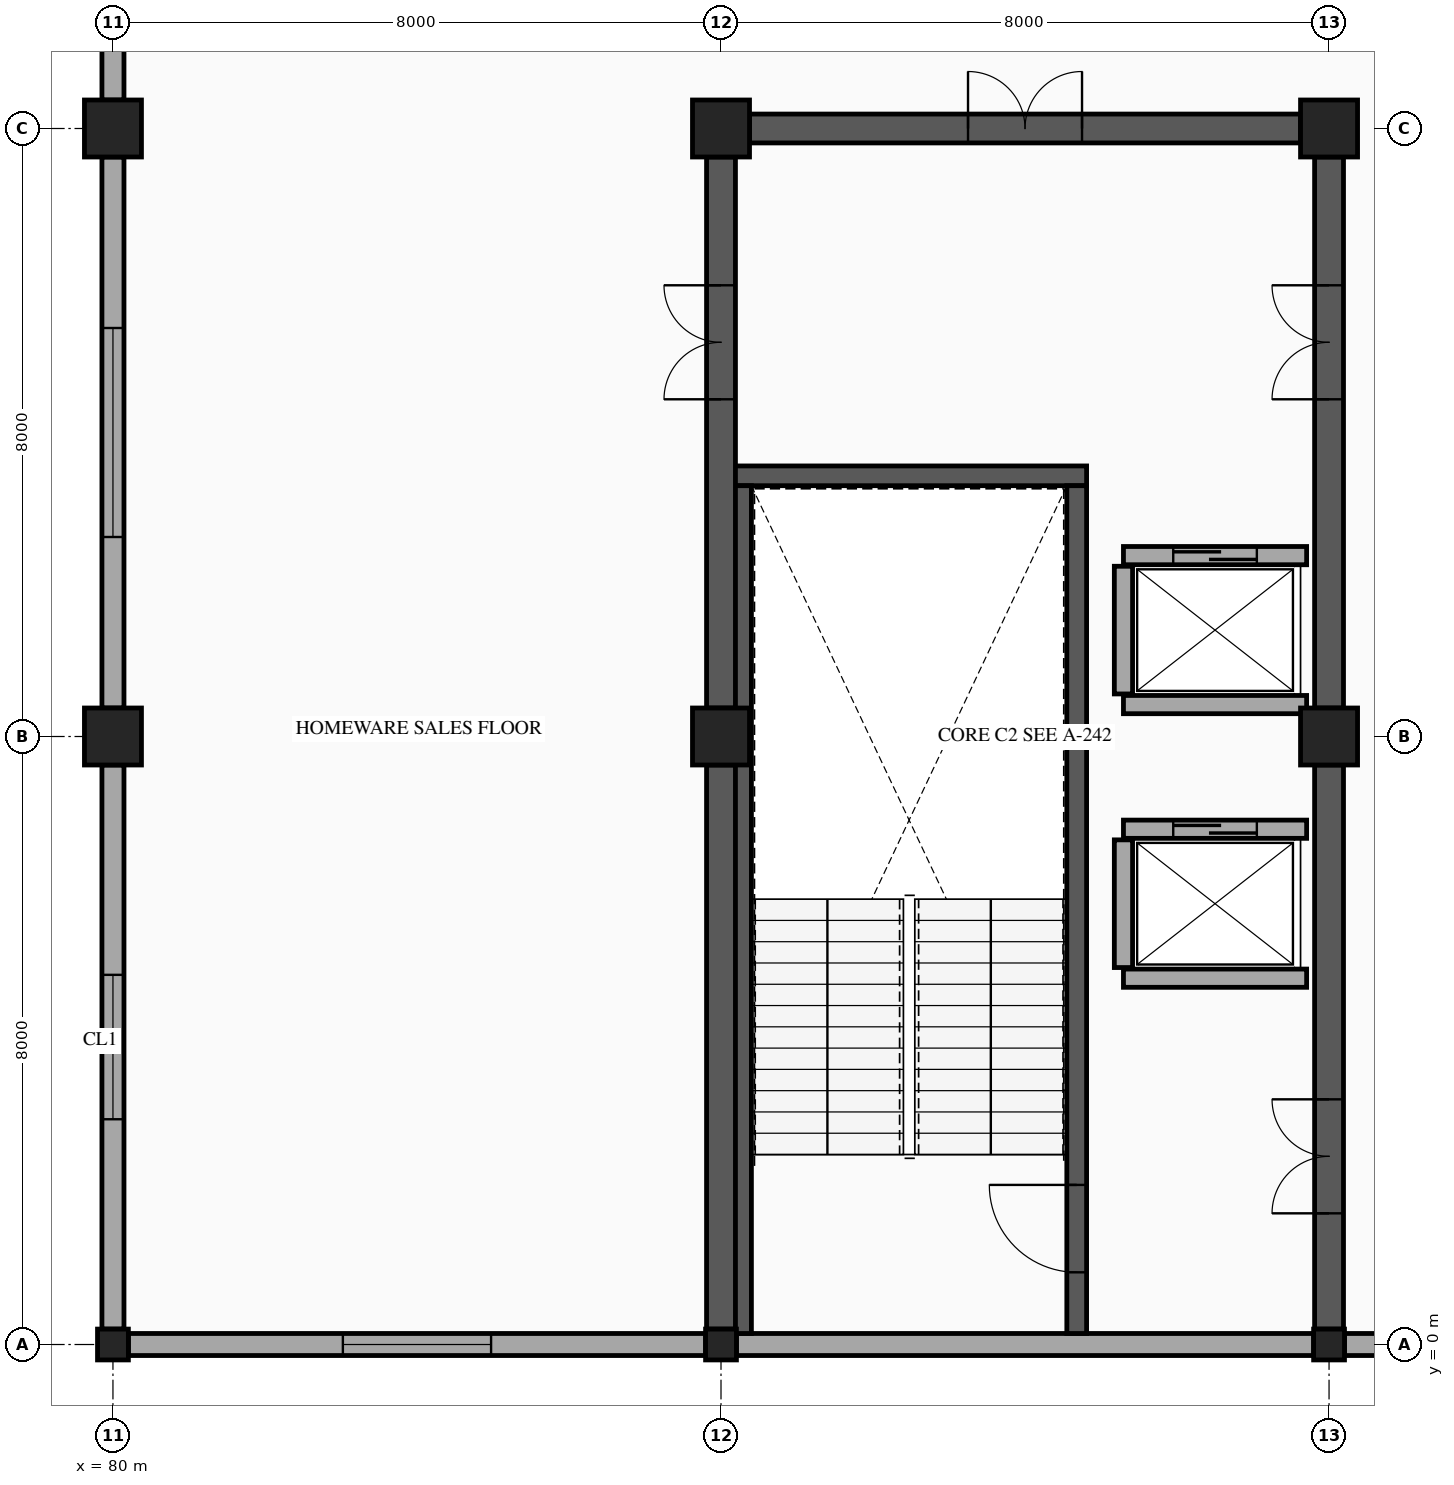
"""IFC4 building model, lengths in metres.
Left out: names, types, materials, properties, quantities, classifications, styles, units other than length and angle.
Written with IfcOpenShell. Run it as: python <this file> out.ifc"""

import sys

from ifc_helpers import new_model, si_unit, direction, frame, frame_2d, origin, origin_2d, place, context, subcontext, project, spatial, rectangle, hollow_rectangle, extrude, element, fill, save


model = new_model("IFC4")
c1 = context("Model", 3, precision=1e-05, world=origin(), true_north=direction((0.0, 1.0)))
c2 = subcontext(c1, "Body", "Model", "MODEL_VIEW")
j1 = project(units=[si_unit("LENGTHUNIT", "METRE"), si_unit("PLANEANGLEUNIT", "RADIAN")], contexts=[c1])
p1 = place(None, origin())
s1 = spatial("IfcSite", under=j1, at=p1, CompositionType="ELEMENT")
p2 = place(p1, origin())
s2 = spatial("IfcBuilding", under=s1, at=p2, CompositionType="ELEMENT")
p3 = place(p2, frame((0.0, 0.0, 19.4)))
s3 = spatial("IfcBuildingStorey", under=s2, at=p3, CompositionType="ELEMENT", Elevation=19.4)
p4 = place(p3, frame((80.0, 0.0, 0.0), z_axis=(0.0, 0.0, 1.0), x_axis=(1.0, 0.0, 0.0)))
e1 = element("IfcColumn", 1, at=p4, inside=s3, PredefinedType="COLUMN", context=c2, shape_type="SweptSolid", body=[
    extrude(hollow_rectangle(XDim=0.406, YDim=0.406, WallThickness=0.015, InnerFilletRadius=0.015, OuterFilletRadius=0.029, at=origin_2d()), origin(), (0.0, 0.0, 1.0), 4.5),
])
for number, where, z_axis, x_axis in (
    (2, (80.0, 8.0, 0.0), (0.0, 0.0, 1.0), (1.0, 0.0, 0.0)),
    (3, (80.0, 16.0, 0.0), (0.0, 0.0, 1.0), (1.0, 0.0, 0.0)),
):
    element("IfcColumn", number, at=place(p3, frame(where, z_axis=z_axis, x_axis=x_axis)), inside=s3, PredefinedType="COLUMN", context=c2, shape_type="SweptSolid", body=[
        extrude(rectangle(XDim=0.75, YDim=0.75, at=origin_2d()), origin(), (0.0, 0.0, 1.0), 4.5),
    ])
p5 = place(p3, frame((88.0, 0.0, 0.0), z_axis=(0.0, 0.0, 1.0), x_axis=(1.0, 0.0, 0.0)))
e4 = element("IfcColumn", 4, at=p5, inside=s3, PredefinedType="COLUMN", context=c2, shape_type="SweptSolid", body=[
    extrude(hollow_rectangle(XDim=0.406, YDim=0.406, WallThickness=0.015, InnerFilletRadius=0.015, OuterFilletRadius=0.029, at=origin_2d()), origin(), (0.0, 0.0, 1.0), 4.5),
])
for number, where, z_axis, x_axis in (
    (5, (88.0, 8.0, 0.0), (0.0, 0.0, 1.0), (1.0, 0.0, 0.0)),
    (6, (88.0, 16.0, 0.0), (0.0, 0.0, 1.0), (1.0, 0.0, 0.0)),
):
    element("IfcColumn", number, at=place(p3, frame(where, z_axis=z_axis, x_axis=x_axis)), inside=s3, PredefinedType="COLUMN", context=c2, shape_type="SweptSolid", body=[
        extrude(rectangle(XDim=0.75, YDim=0.75, at=origin_2d()), origin(), (0.0, 0.0, 1.0), 4.5),
    ])
p6 = place(p3, frame((96.0, 0.0, 0.0), z_axis=(0.0, 0.0, 1.0), x_axis=(1.0, 0.0, 0.0)))
e7 = element("IfcColumn", 7, at=p6, inside=s3, PredefinedType="COLUMN", context=c2, shape_type="SweptSolid", body=[
    extrude(hollow_rectangle(XDim=0.406, YDim=0.406, WallThickness=0.015, InnerFilletRadius=0.015, OuterFilletRadius=0.029, at=origin_2d()), origin(), (0.0, 0.0, 1.0), 4.5),
])
for number, where, z_axis, x_axis in (
    (8, (96.0, 8.0, 0.0), (0.0, 0.0, 1.0), (1.0, 0.0, 0.0)),
    (9, (96.0, 16.0, 0.0), (0.0, 0.0, 1.0), (1.0, 0.0, 0.0)),
):
    element("IfcColumn", number, at=place(p3, frame(where, z_axis=z_axis, x_axis=x_axis)), inside=s3, PredefinedType="COLUMN", context=c2, shape_type="SweptSolid", body=[
        extrude(rectangle(XDim=0.75, YDim=0.75, at=origin_2d()), origin(), (0.0, 0.0, 1.0), 4.5),
    ])
p7 = place(p3, frame((103.797, 0.0, 0.0), z_axis=(0.0, 0.0, 1.0), x_axis=(-1.0, 0.0, 0.0)))
e10 = element("IfcWall", 10, at=p7, inside=s3, PredefinedType="STANDARD", context=c2, shape_type="SweptSolid", body=[
    extrude(rectangle(XDim=7.594, YDim=0.29, at=frame_2d((3.797, 0.0))), origin(), (0.0, 0.0, 1.0), 3.48),
])
p8 = place(p7, frame((2.822, 0.0, 0.8)))
e11 = element("IfcOpeningElement", 11, at=p8, cuts=e10, PredefinedType="OPENING", context=c2, shape_type="SweptSolid", body=[
    extrude(rectangle(XDim=1.95, YDim=1.8, at=frame_2d((0.975, 0.9))), frame((0.0, 0.155, 0.0), z_axis=(0.0, -1.0, 0.0), x_axis=(1.0, 0.0, 0.0)), (0.0, 0.0, 1.0), 0.31),
])
p9 = place(p3, frame((95.797, 0.0, 0.0), z_axis=(0.0, 0.0, 1.0), x_axis=(-1.0, 0.0, 0.0)))
e12 = element("IfcWall", 12, at=p9, inside=s3, PredefinedType="STANDARD", context=c2, shape_type="SweptSolid", body=[
    extrude(rectangle(XDim=7.594, YDim=0.29, at=frame_2d((3.797, 0.0))), origin(), (0.0, 0.0, 1.0), 3.48),
])
p10 = place(p3, frame((87.797, 0.0, 0.0), z_axis=(0.0, 0.0, 1.0), x_axis=(-1.0, 0.0, 0.0)))
e13 = element("IfcWall", 13, at=p10, inside=s3, PredefinedType="STANDARD", context=c2, shape_type="SweptSolid", body=[
    extrude(rectangle(XDim=7.594, YDim=0.29, at=frame_2d((3.797, 0.0))), origin(), (0.0, 0.0, 1.0), 3.48),
])
p11 = place(p10, frame((2.822, 0.0, 0.8)))
e14 = element("IfcOpeningElement", 14, at=p11, cuts=e13, PredefinedType="OPENING", context=c2, shape_type="SweptSolid", body=[
    extrude(rectangle(XDim=1.95, YDim=1.8, at=frame_2d((0.975, 0.9))), frame((0.0, 0.155, 0.0), z_axis=(0.0, -1.0, 0.0), x_axis=(1.0, 0.0, 0.0)), (0.0, 0.0, 1.0), 0.31),
])
p12 = place(p3, frame((80.0, 0.203, 0.0), z_axis=(0.0, 0.0, 1.0), x_axis=(0.0, 1.0, 0.0)))
e15 = element("IfcWall", 15, at=p12, inside=s3, PredefinedType="STANDARD", context=c2, shape_type="SweptSolid", body=[
    extrude(rectangle(XDim=7.422, YDim=0.29, at=frame_2d((3.711, 0.0))), origin(), (0.0, 0.0, 1.0), 3.48),
])
p13 = place(p12, frame((2.761, 0.0, 0.8)))
e16 = element("IfcOpeningElement", 16, at=p13, cuts=e15, PredefinedType="OPENING", context=c2, shape_type="SweptSolid", body=[
    extrude(rectangle(XDim=1.9, YDim=1.65, at=frame_2d((0.95, 0.825))), frame((0.0, 0.155, 0.0), z_axis=(0.0, -1.0, 0.0), x_axis=(1.0, 0.0, 0.0)), (0.0, 0.0, 1.0), 0.31),
])
p14 = place(p3, frame((80.0, 8.375, 0.0), z_axis=(0.0, 0.0, 1.0), x_axis=(0.0, 1.0, 0.0)))
e17 = element("IfcWall", 17, at=p14, inside=s3, PredefinedType="STANDARD", context=c2, shape_type="SweptSolid", body=[
    extrude(rectangle(XDim=7.25, YDim=0.29, at=frame_2d((3.625, 0.0))), origin(), (0.0, 0.0, 1.0), 3.48),
])
p15 = place(p14, frame((2.25, 0.0, 0.8)))
e18 = element("IfcOpeningElement", 18, at=p15, cuts=e17, PredefinedType="OPENING", context=c2, shape_type="SweptSolid", body=[
    extrude(rectangle(XDim=2.75, YDim=2.15, at=frame_2d((1.375, 1.075))), frame((0.0, 0.155, 0.0), z_axis=(0.0, -1.0, 0.0), x_axis=(1.0, 0.0, 0.0)), (0.0, 0.0, 1.0), 0.31),
])
p16 = place(p3, frame((80.0, 16.375, 0.0), z_axis=(0.0, 0.0, 1.0), x_axis=(0.0, 1.0, 0.0)))
e19 = element("IfcWall", 19, at=p16, inside=s3, PredefinedType="STANDARD", context=c2, shape_type="SweptSolid", body=[
    extrude(rectangle(XDim=7.3, YDim=0.29, at=frame_2d((3.65, 0.0))), origin(), (0.0, 0.0, 1.0), 3.48),
])
p17 = place(p3, frame((88.14, 11.43, 0.0), z_axis=(0.0, 0.0, 1.0), x_axis=(1.0, 0.0, 0.0)))
e20 = element("IfcWall", 20, at=p17, inside=s3, PredefinedType="SHEAR", context=c2, shape_type="SweptSolid", body=[
    extrude(rectangle(XDim=4.67, YDim=0.26, at=frame_2d((2.335, 0.0))), origin(), (0.0, 0.0, 1.0), 4.28),
])
p18 = place(p3, frame((88.27, 0.145, 0.0), z_axis=(0.0, 0.0, 1.0), x_axis=(0.0, 1.0, 0.0)))
e21 = element("IfcWall", 21, at=p18, inside=s3, PredefinedType="SHEAR", context=c2, shape_type="SweptSolid", body=[
    extrude(rectangle(XDim=11.155, YDim=0.26, at=frame_2d((5.578, 0.0))), origin(), (0.0, 0.0, 1.0), 4.28),
])
p19 = place(p3, frame((92.68, 0.145, 0.0), z_axis=(0.0, 0.0, 1.0), x_axis=(0.0, 1.0, 0.0)))
e22 = element("IfcWall", 22, at=p19, inside=s3, PredefinedType="SHEAR", context=c2, shape_type="SweptSolid", body=[
    extrude(rectangle(XDim=11.155, YDim=0.26, at=frame_2d((5.578, 0.0))), origin(), (0.0, 0.0, 1.0), 4.28),
])
p20 = place(p19, frame((0.805, 0.0, 0.0)))
e23 = element("IfcOpeningElement", 23, at=p20, cuts=e22, PredefinedType="OPENING", context=c2, shape_type="SweptSolid", body=[
    extrude(rectangle(XDim=1.15, YDim=2.15, at=frame_2d((0.575, 1.075))), frame((0.0, 0.14, 0.0), z_axis=(0.0, -1.0, 0.0), x_axis=(1.0, 0.0, 0.0)), (0.0, 0.0, 1.0), 0.28),
])
p21 = place(p3, frame((88.375, 16.0, 0.0), z_axis=(0.0, 0.0, 1.0), x_axis=(1.0, 0.0, 0.0)))
e24 = element("IfcWall", 24, at=p21, inside=s3, PredefinedType="SHEAR", context=c2, shape_type="SweptSolid", body=[
    extrude(rectangle(XDim=7.25, YDim=0.38, at=frame_2d((3.625, 0.0))), origin(), (0.0, 0.0, 1.0), 4.28),
])
p22 = place(p21, frame((2.875, 0.0, 0.0)))
e25 = element("IfcOpeningElement", 25, at=p22, cuts=e24, PredefinedType="OPENING", context=c2, shape_type="SweptSolid", body=[
    extrude(rectangle(XDim=1.5, YDim=2.15, at=frame_2d((0.75, 1.075))), frame((0.0, 0.2, 0.0), z_axis=(0.0, -1.0, 0.0), x_axis=(1.0, 0.0, 0.0)), (0.0, 0.0, 1.0), 0.4),
])
p23 = place(p3, frame((88.0, 0.203, 0.0), z_axis=(0.0, 0.0, 1.0), x_axis=(0.0, 1.0, 0.0)))
e26 = element("IfcWall", 26, at=p23, inside=s3, PredefinedType="SHEAR", context=c2, shape_type="SweptSolid", body=[
    extrude(rectangle(XDim=7.422, YDim=0.38, at=frame_2d((3.711, 0.0))), origin(), (0.0, 0.0, 1.0), 4.28),
])
p24 = place(p3, frame((88.0, 8.375, 0.0), z_axis=(0.0, 0.0, 1.0), x_axis=(0.0, 1.0, 0.0)))
e27 = element("IfcWall", 27, at=p24, inside=s3, PredefinedType="SHEAR", context=c2, shape_type="SweptSolid", body=[
    extrude(rectangle(XDim=7.25, YDim=0.38, at=frame_2d((3.625, 0.0))), origin(), (0.0, 0.0, 1.0), 4.28),
])
p25 = place(p24, frame((4.062, 0.0, 0.0)))
e28 = element("IfcOpeningElement", 28, at=p25, cuts=e27, PredefinedType="OPENING", context=c2, shape_type="SweptSolid", body=[
    extrude(rectangle(XDim=1.5, YDim=2.15, at=frame_2d((0.75, 1.075))), frame((0.0, 0.2, 0.0), z_axis=(0.0, -1.0, 0.0), x_axis=(1.0, 0.0, 0.0)), (0.0, 0.0, 1.0), 0.4),
])
p26 = place(p3, frame((96.0, 0.203, 0.0), z_axis=(0.0, 0.0, 1.0), x_axis=(0.0, 1.0, 0.0)))
e29 = element("IfcWall", 29, at=p26, inside=s3, PredefinedType="SHEAR", context=c2, shape_type="SweptSolid", body=[
    extrude(rectangle(XDim=7.422, YDim=0.38, at=frame_2d((3.711, 0.0))), origin(), (0.0, 0.0, 1.0), 4.28),
])
p27 = place(p26, frame((1.523, 0.0, 0.0)))
e30 = element("IfcOpeningElement", 30, at=p27, cuts=e29, PredefinedType="OPENING", context=c2, shape_type="SweptSolid", body=[
    extrude(rectangle(XDim=1.5, YDim=2.15, at=frame_2d((0.75, 1.075))), frame((0.0, 0.2, 0.0), z_axis=(0.0, -1.0, 0.0), x_axis=(1.0, 0.0, 0.0)), (0.0, 0.0, 1.0), 0.4),
])
p28 = place(p3, frame((96.0, 8.375, 0.0), z_axis=(0.0, 0.0, 1.0), x_axis=(0.0, 1.0, 0.0)))
e31 = element("IfcWall", 31, at=p28, inside=s3, PredefinedType="SHEAR", context=c2, shape_type="SweptSolid", body=[
    extrude(rectangle(XDim=7.25, YDim=0.38, at=frame_2d((3.625, 0.0))), origin(), (0.0, 0.0, 1.0), 4.28),
])
p29 = place(p28, frame((4.062, 0.0, 0.0)))
e32 = element("IfcOpeningElement", 32, at=p29, cuts=e31, PredefinedType="OPENING", context=c2, shape_type="SweptSolid", body=[
    extrude(rectangle(XDim=1.5, YDim=2.15, at=frame_2d((0.75, 1.075))), frame((0.0, 0.2, 0.0), z_axis=(0.0, -1.0, 0.0), x_axis=(1.0, 0.0, 0.0)), (0.0, 0.0, 1.0), 0.4),
])
p30 = place(p3, frame((93.295, 6.78, 0.0), z_axis=(0.0, 0.0, 1.0), x_axis=(1.0, 0.0, 0.0)))
e33 = element("IfcWall", 33, at=p30, inside=s3, PredefinedType="PARTITIONING", context=c2, shape_type="SweptSolid", body=[
    extrude(rectangle(XDim=2.41, YDim=0.24, at=frame_2d((1.205, 0.0))), origin(), (0.0, 0.0, 1.0), 4.28),
])
p31 = place(p30, frame((0.655, 0.0, 0.0)))
e34 = element("IfcOpeningElement", 34, at=p31, cuts=e33, PredefinedType="OPENING", context=c2, shape_type="SweptSolid", body=[
    extrude(rectangle(XDim=1.1, YDim=2.15, at=frame_2d((0.55, 1.075))), frame((0.0, 0.13, 0.0), z_axis=(0.0, -1.0, 0.0), x_axis=(1.0, 0.0, 0.0)), (0.0, 0.0, 1.0), 0.26),
])
p32 = place(p3, frame((93.295, 4.82, 0.0), z_axis=(0.0, 0.0, 1.0), x_axis=(1.0, 0.0, 0.0)))
e35 = element("IfcWall", 35, at=p32, inside=s3, PredefinedType="PARTITIONING", context=c2, shape_type="SweptSolid", body=[
    extrude(rectangle(XDim=2.41, YDim=0.24, at=frame_2d((1.205, 0.0))), origin(), (0.0, 0.0, 1.0), 4.28),
])
p33 = place(p3, frame((93.295, 4.96, 0.0), z_axis=(0.0, 0.0, 1.0), x_axis=(0.0, 1.0, 0.0)))
e36 = element("IfcWall", 36, at=p33, inside=s3, PredefinedType="PARTITIONING", context=c2, shape_type="SweptSolid", body=[
    extrude(rectangle(XDim=1.68, YDim=0.24, at=frame_2d((0.84, 0.0))), origin(), (0.0, 0.0, 1.0), 4.28),
])
p34 = place(p3, frame((93.295, 10.38, 0.0), z_axis=(0.0, 0.0, 1.0), x_axis=(1.0, 0.0, 0.0)))
e37 = element("IfcWall", 37, at=p34, inside=s3, PredefinedType="PARTITIONING", context=c2, shape_type="SweptSolid", body=[
    extrude(rectangle(XDim=2.41, YDim=0.24, at=frame_2d((1.205, 0.0))), origin(), (0.0, 0.0, 1.0), 4.28),
])
p35 = place(p34, frame((0.655, 0.0, 0.0)))
e38 = element("IfcOpeningElement", 38, at=p35, cuts=e37, PredefinedType="OPENING", context=c2, shape_type="SweptSolid", body=[
    extrude(rectangle(XDim=1.1, YDim=2.15, at=frame_2d((0.55, 1.075))), frame((0.0, 0.13, 0.0), z_axis=(0.0, -1.0, 0.0), x_axis=(1.0, 0.0, 0.0)), (0.0, 0.0, 1.0), 0.26),
])
p36 = place(p3, frame((93.295, 8.42, 0.0), z_axis=(0.0, 0.0, 1.0), x_axis=(1.0, 0.0, 0.0)))
e39 = element("IfcWall", 39, at=p36, inside=s3, PredefinedType="PARTITIONING", context=c2, shape_type="SweptSolid", body=[
    extrude(rectangle(XDim=2.41, YDim=0.24, at=frame_2d((1.205, 0.0))), origin(), (0.0, 0.0, 1.0), 4.28),
])
p37 = place(p3, frame((93.295, 8.56, 0.0), z_axis=(0.0, 0.0, 1.0), x_axis=(0.0, 1.0, 0.0)))
e40 = element("IfcWall", 40, at=p37, inside=s3, PredefinedType="PARTITIONING", context=c2, shape_type="SweptSolid", body=[
    extrude(rectangle(XDim=1.68, YDim=0.24, at=frame_2d((0.84, 0.0))), origin(), (0.0, 0.0, 1.0), 4.28),
])
p38 = place(p11, origin())
e41 = element("IfcWindow", 41, at=p38, inside=s3, PartitioningType="DOUBLE_PANEL_VERTICAL", PredefinedType="WINDOW", context=c2, shape_type="SweptSolid", body=[
    extrude(rectangle(XDim=1.95, YDim=1.8, at=frame_2d((0.975, 0.9))), frame((0.0, 0.03, 0.0), z_axis=(0.0, -1.0, 0.0), x_axis=(1.0, 0.0, 0.0)), (0.0, 0.0, 1.0), 0.06),
])
fill(e14, e41)
p39 = place(p13, origin())
e42 = element("IfcWindow", 42, at=p39, inside=s3, PartitioningType="DOUBLE_PANEL_VERTICAL", PredefinedType="WINDOW", context=c2, shape_type="SweptSolid", body=[
    extrude(rectangle(XDim=1.9, YDim=1.65, at=frame_2d((0.95, 0.825))), frame((0.0, 0.03, 0.0), z_axis=(0.0, -1.0, 0.0), x_axis=(1.0, 0.0, 0.0)), (0.0, 0.0, 1.0), 0.06),
])
fill(e16, e42)
p40 = place(p15, origin())
e43 = element("IfcWindow", 43, at=p40, inside=s3, PartitioningType="TRIPLE_PANEL_VERTICAL", PredefinedType="WINDOW", context=c2, shape_type="SweptSolid", body=[
    extrude(rectangle(XDim=2.75, YDim=2.15, at=frame_2d((1.375, 1.075))), frame((0.0, 0.03, 0.0), z_axis=(0.0, -1.0, 0.0), x_axis=(1.0, 0.0, 0.0)), (0.0, 0.0, 1.0), 0.06),
])
fill(e18, e43)
p41 = place(p20, origin())
e44 = element("IfcDoor", 44, at=p41, inside=s3, OperationType="SINGLE_SWING_RIGHT", PredefinedType="DOOR", context=c2, shape_type="SweptSolid", body=[
    extrude(rectangle(XDim=1.15, YDim=2.15, at=frame_2d((0.575, 1.075))), frame((0.0, 0.025, 0.0), z_axis=(0.0, -1.0, 0.0), x_axis=(1.0, 0.0, 0.0)), (0.0, 0.0, 1.0), 0.05),
])
fill(e23, e44)
p42 = place(p22, origin())
e45 = element("IfcDoor", 45, at=p42, inside=s3, OperationType="DOUBLE_DOOR_SINGLE_SWING", PredefinedType="DOOR", context=c2, shape_type="SweptSolid", body=[
    extrude(rectangle(XDim=1.5, YDim=2.15, at=frame_2d((0.75, 1.075))), frame((0.0, 0.025, 0.0), z_axis=(0.0, -1.0, 0.0), x_axis=(1.0, 0.0, 0.0)), (0.0, 0.0, 1.0), 0.05),
])
fill(e25, e45)
p43 = place(p25, origin())
e46 = element("IfcDoor", 46, at=p43, inside=s3, OperationType="DOUBLE_DOOR_SINGLE_SWING", PredefinedType="DOOR", context=c2, shape_type="SweptSolid", body=[
    extrude(rectangle(XDim=1.5, YDim=2.15, at=frame_2d((0.75, 1.075))), frame((0.0, 0.025, 0.0), z_axis=(0.0, -1.0, 0.0), x_axis=(1.0, 0.0, 0.0)), (0.0, 0.0, 1.0), 0.05),
])
fill(e28, e46)
p44 = place(p27, origin())
e47 = element("IfcDoor", 47, at=p44, inside=s3, OperationType="DOUBLE_DOOR_SINGLE_SWING", PredefinedType="DOOR", context=c2, shape_type="SweptSolid", body=[
    extrude(rectangle(XDim=1.5, YDim=2.15, at=frame_2d((0.75, 1.075))), frame((0.0, 0.025, 0.0), z_axis=(0.0, -1.0, 0.0), x_axis=(1.0, 0.0, 0.0)), (0.0, 0.0, 1.0), 0.05),
])
fill(e30, e47)
p45 = place(p29, origin())
e48 = element("IfcDoor", 48, at=p45, inside=s3, OperationType="DOUBLE_DOOR_SINGLE_SWING", PredefinedType="DOOR", context=c2, shape_type="SweptSolid", body=[
    extrude(rectangle(XDim=1.5, YDim=2.15, at=frame_2d((0.75, 1.075))), frame((0.0, 0.025, 0.0), z_axis=(0.0, -1.0, 0.0), x_axis=(1.0, 0.0, 0.0)), (0.0, 0.0, 1.0), 0.05),
])
fill(e32, e48)
p46 = place(p31, origin())
e49 = element("IfcDoor", 49, at=p46, inside=s3, OperationType="SLIDING_TO_LEFT", PredefinedType="DOOR", context=c2, shape_type="SweptSolid", body=[
    extrude(rectangle(XDim=1.1, YDim=2.15, at=frame_2d((0.55, 1.075))), frame((0.0, 0.025, 0.0), z_axis=(0.0, -1.0, 0.0), x_axis=(1.0, 0.0, 0.0)), (0.0, 0.0, 1.0), 0.05),
])
fill(e34, e49)
p47 = place(p35, origin())
e50 = element("IfcDoor", 50, at=p47, inside=s3, OperationType="SLIDING_TO_LEFT", PredefinedType="DOOR", context=c2, shape_type="SweptSolid", body=[
    extrude(rectangle(XDim=1.1, YDim=2.15, at=frame_2d((0.55, 1.075))), frame((0.0, 0.025, 0.0), z_axis=(0.0, -1.0, 0.0), x_axis=(1.0, 0.0, 0.0)), (0.0, 0.0, 1.0), 0.05),
])
fill(e38, e50)
save(model, sys.argv[1])
